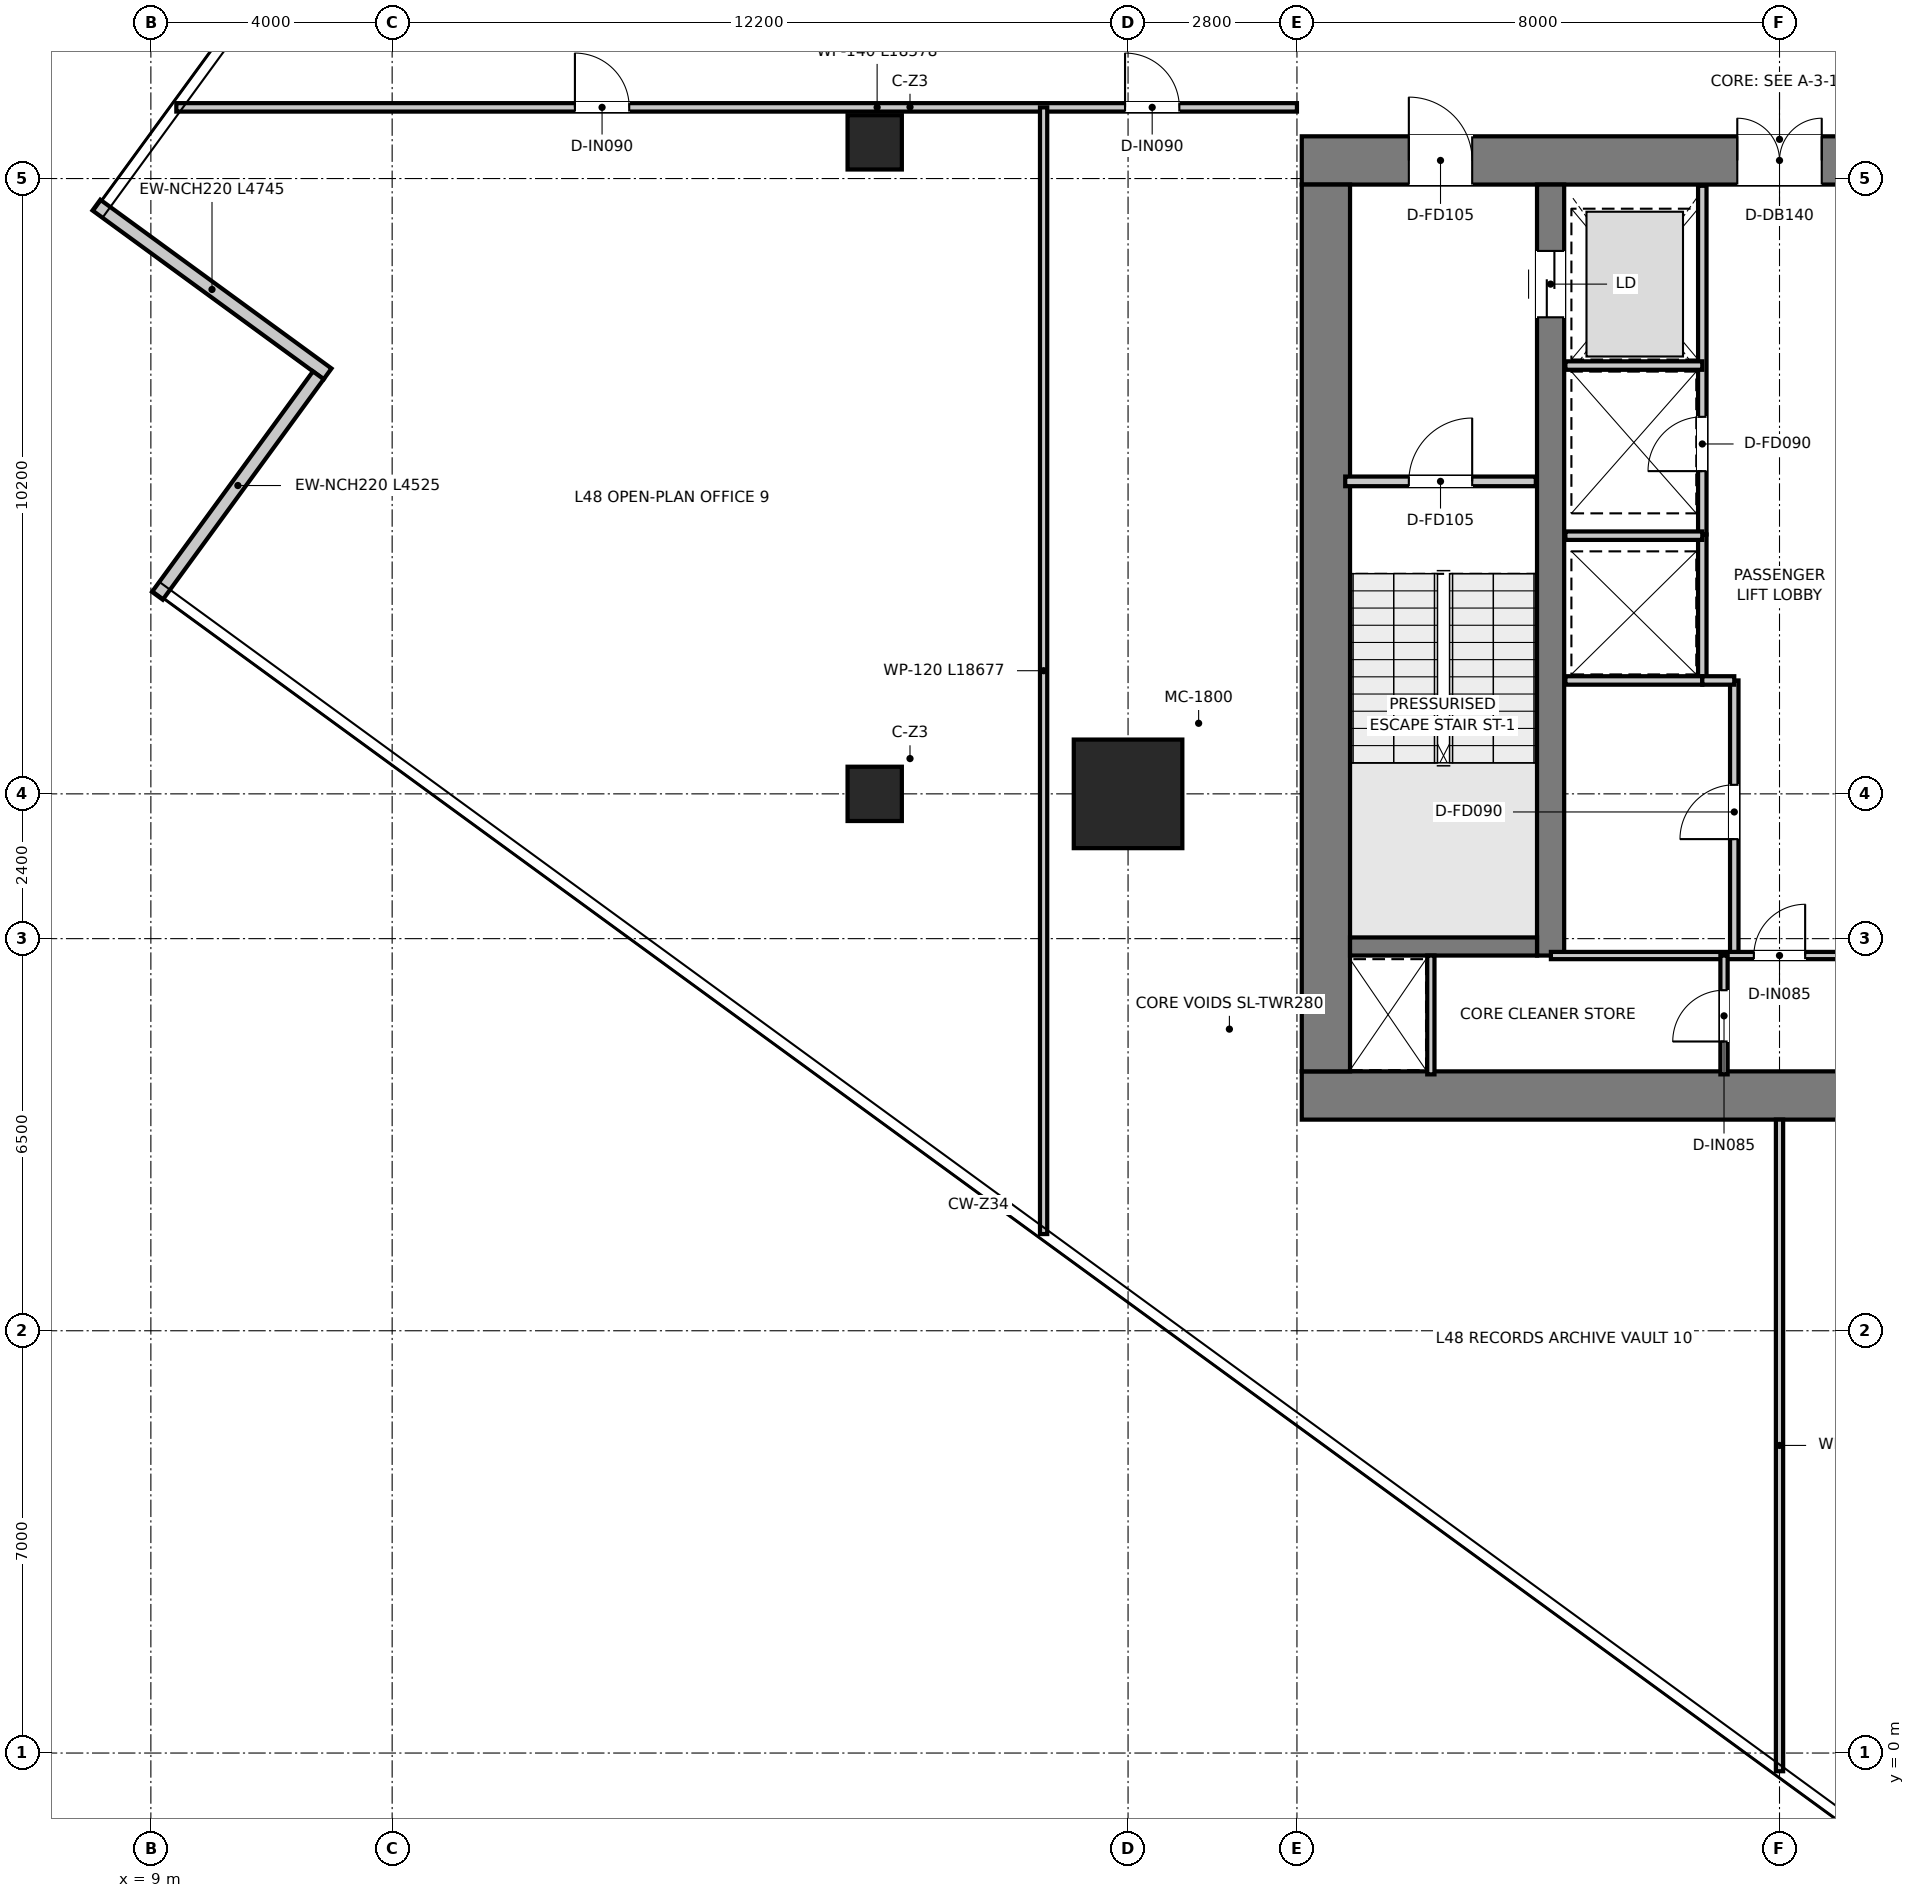
"""IFC4 building model, lengths in metres.
Left out: names, types, materials, properties, quantities, classifications, styles, units other than length and angle.
Written with IfcOpenShell. Run it as: python <this file> out.ifc"""

import sys

from ifc_helpers import new_model, si_unit, direction, frame, frame_2d, origin, origin_2d, place, context, subcontext, project, spatial, rectangle, extrude, source, transform, mapped, element, fill, save


model = new_model("IFC4")
c1 = context("Model", 3, precision=1e-05, world=origin(), true_north=direction((0.0, 1.0)))
c2 = subcontext(c1, "Body", "Model", "MODEL_VIEW")
j1 = project(units=[si_unit("LENGTHUNIT", "METRE"), si_unit("PLANEANGLEUNIT", "RADIAN")], contexts=[c1])
p1 = place(None, origin())
s1 = spatial("IfcSite", under=j1, at=p1, CompositionType="ELEMENT")
p2 = place(p1, origin())
s2 = spatial("IfcBuilding", under=s1, at=p2, CompositionType="ELEMENT")
p3 = place(p2, frame((0.0, 0.0, 197.55)))
s3 = spatial("IfcBuildingStorey", under=s2, at=p3, CompositionType="ELEMENT", Elevation=197.55)
p4 = place(p3, frame((28.08, 10.9, 0.0), z_axis=(0.0, 0.0, 1.0), x_axis=(1.0, 0.0, 0.0)))
e1 = element("IfcWall", 1, at=p4, inside=s3, PredefinedType="SHEAR", context=c2, shape_type="SweptSolid", body=[
    extrude(rectangle(XDim=15.84, YDim=0.8, at=frame_2d((7.92, 0.0))), origin(), (0.0, 0.0, 1.0), 3.95),
])
p5 = place(p3, frame((28.08, 26.4, 0.0), z_axis=(0.0, 0.0, 1.0), x_axis=(1.0, 0.0, 0.0)))
e2 = element("IfcWall", 2, at=p5, inside=s3, PredefinedType="SHEAR", context=c2, shape_type="SweptSolid", body=[
    extrude(rectangle(XDim=15.84, YDim=0.8, at=frame_2d((7.92, 0.0))), origin(), (0.0, 0.0, 1.0), 3.95),
])
p6 = place(p5, frame((7.22, 0.0, 0.0)))
e3 = element("IfcOpeningElement", 3, at=p6, cuts=e2, PredefinedType="OPENING", context=c2, shape_type="SweptSolid", body=[
    extrude(rectangle(XDim=1.4, YDim=2.2, at=frame_2d((0.7, 1.1))), frame((0.0, 0.41, 0.0), z_axis=(0.0, -1.0, 0.0), x_axis=(1.0, 0.0, 0.0)), (0.0, 0.0, 1.0), 0.82),
])
p7 = place(p5, frame((1.775, 0.0, 0.0)))
e4 = element("IfcOpeningElement", 4, at=p7, cuts=e2, PredefinedType="OPENING", context=c2, shape_type="SweptSolid", body=[
    extrude(rectangle(XDim=1.05, YDim=2.1, at=frame_2d((0.525, 1.05))), frame((0.0, 0.41, 0.0), z_axis=(0.0, -1.0, 0.0), x_axis=(1.0, 0.0, 0.0)), (0.0, 0.0, 1.0), 0.82),
])
p8 = place(p5, frame((13.015, 0.0, 0.0)))
e5 = element("IfcOpeningElement", 5, at=p8, cuts=e2, PredefinedType="OPENING", context=c2, shape_type="SweptSolid", body=[
    extrude(rectangle(XDim=1.05, YDim=2.1, at=frame_2d((0.525, 1.05))), frame((0.0, 0.41, 0.0), z_axis=(0.0, -1.0, 0.0), x_axis=(1.0, 0.0, 0.0)), (0.0, 0.0, 1.0), 0.82),
])
p9 = place(p3, frame((28.48, 11.3, 0.0), z_axis=(0.0, 0.0, 1.0), x_axis=(0.0, 1.0, 0.0)))
e6 = element("IfcWall", 6, at=p9, inside=s3, PredefinedType="SHEAR", context=c2, shape_type="SweptSolid", body=[
    extrude(rectangle(XDim=14.7, YDim=0.8, at=frame_2d((7.35, 0.0))), origin(), (0.0, 0.0, 1.0), 3.95),
])
p10 = place(p3, frame((32.205, 13.22, 0.0), z_axis=(0.0, 0.0, 1.0), x_axis=(0.0, 1.0, 0.0)))
e7 = element("IfcWall", 7, at=p10, inside=s3, PredefinedType="SHEAR", context=c2, shape_type="SweptSolid", body=[
    extrude(rectangle(XDim=12.78, YDim=0.45, at=frame_2d((6.39, 0.0))), origin(), (0.0, 0.0, 1.0), 3.95),
])
p11 = place(p10, frame((10.58, 0.0, 0.0)))
e8 = element("IfcOpeningElement", 8, at=p11, cuts=e7, PredefinedType="OPENING", context=c2, shape_type="SweptSolid", body=[
    extrude(rectangle(XDim=1.1, YDim=2.15, at=frame_2d((0.55, 1.075))), frame((0.0, 0.235, 0.0), z_axis=(0.0, -1.0, 0.0), x_axis=(1.0, 0.0, 0.0)), (0.0, 0.0, 1.0), 0.47),
])
p12 = place(p3, frame((28.88, 13.37, 0.0), z_axis=(0.0, 0.0, 1.0), x_axis=(1.0, 0.0, 0.0)))
e9 = element("IfcWall", 9, at=p12, inside=s3, PredefinedType="SHEAR", context=c2, shape_type="SweptSolid", body=[
    extrude(rectangle(XDim=3.1, YDim=0.3, at=frame_2d((1.55, 0.0))), origin(), (0.0, 0.0, 1.0), 3.95),
])
m1 = source(origin(), c2, "Body", "SweptSolid", [
    extrude(rectangle(XDim=1.8, YDim=1.8, at=origin_2d()), origin(), (0.0, 0.0, 1.0), 3.95),
])
p13 = place(p3, frame((25.2, 15.9, 0.0), z_axis=(0.0, 0.0, 1.0), x_axis=(1.0, 0.0, 0.0)))
e10 = element("IfcColumn", 10, at=p13, inside=s3, PredefinedType="USERDEFINED", context=c2, shape_type="MappedRepresentation", body=[
    mapped(m1, transform((0.0, 0.0, 0.0), x_axis=(1.0, 0.0, 0.0), y_axis=(0.0, 1.0, 0.0), z_axis=(0.0, 0.0, 1.0), scale=1.0)),
])
m2 = source(origin(), c2, "Body", "SweptSolid", [
    extrude(rectangle(XDim=0.9, YDim=0.9, at=origin_2d()), origin(), (0.0, 0.0, 1.0), 3.95),
])
for number, where, z_axis, x_axis in (
    (11, (21.0, 15.9, 0.0), (0.0, 0.0, 1.0), (1.0, 0.0, 0.0)),
    (12, (21.0, 26.7, 0.0), (0.0, 0.0, 1.0), (1.0, 0.0, 0.0)),
):
    element("IfcColumn", number, at=place(p3, frame(where, z_axis=z_axis, x_axis=x_axis)), inside=s3, PredefinedType="COLUMN", context=c2, shape_type="MappedRepresentation", body=[
        mapped(m2, transform((0.0, 0.0, 0.0), x_axis=(1.0, 0.0, 0.0), y_axis=(0.0, 1.0, 0.0), z_axis=(0.0, 0.0, 1.0), scale=1.0)),
    ])
p14 = place(p3, frame((8.097, 25.66, 0.0), z_axis=(0.0, 0.0, 1.0), x_axis=(0.807742607871, -0.589535308044, 0.0)))
e13 = element("IfcWall", 13, at=p14, inside=s3, PredefinedType="ELEMENTEDWALL", context=c2, shape_type="SweptSolid", body=[
    extrude(rectangle(XDim=4.745, YDim=0.22, at=frame_2d((2.373, 0.0))), origin(), (0.0, 0.0, 1.0), 3.59),
])
p15 = place(p3, frame((11.776, 22.839, 0.0), z_axis=(0.0, 0.0, 1.0), x_axis=(-0.589547091209, -0.807734007732, 0.0)))
e14 = element("IfcWall", 14, at=p15, inside=s3, PredefinedType="ELEMENTEDWALL", context=c2, shape_type="SweptSolid", body=[
    extrude(rectangle(XDim=4.525, YDim=0.22, at=frame_2d((2.263, 0.0))), origin(), (0.0, 0.0, 1.0), 3.59),
])
p16 = place(p3, frame((28.8, 21.08, 0.0), z_axis=(0.0, 0.0, 1.0), x_axis=(1.0, 0.0, 0.0)))
e15 = element("IfcWall", 15, at=p16, inside=s3, PredefinedType="PARTITIONING", context=c2, shape_type="SweptSolid", body=[
    extrude(rectangle(XDim=3.16, YDim=0.16, at=frame_2d((1.58, 0.0))), origin(), (0.0, 0.0, 1.0), 3.59),
])
p17 = place(p16, frame((1.055, 0.0, 0.0)))
e16 = element("IfcOpeningElement", 16, at=p17, cuts=e15, PredefinedType="OPENING", context=c2, shape_type="SweptSolid", body=[
    extrude(rectangle(XDim=1.05, YDim=2.1, at=frame_2d((0.525, 1.05))), frame((0.0, 0.09, 0.0), z_axis=(0.0, -1.0, 0.0), x_axis=(1.0, 0.0, 0.0)), (0.0, 0.0, 1.0), 0.18),
])
p18 = place(p3, frame((34.72, 20.2, 0.0), z_axis=(0.0, 0.0, 1.0), x_axis=(0.0, 1.0, 0.0)))
e17 = element("IfcWall", 17, at=p18, inside=s3, PredefinedType="PARTITIONING", context=c2, shape_type="SweptSolid", body=[
    extrude(rectangle(XDim=5.78, YDim=0.14, at=frame_2d((2.89, 0.0))), origin(), (0.0, 0.0, 1.0), 2.59),
])
p19 = place(p18, frame((1.05, 0.0, 0.0)))
e18 = element("IfcOpeningElement", 18, at=p19, cuts=e17, PredefinedType="OPENING", context=c2, shape_type="SweptSolid", body=[
    extrude(rectangle(XDim=0.9, YDim=2.1, at=frame_2d((0.45, 1.05))), frame((0.0, 0.08, 0.0), z_axis=(0.0, -1.0, 0.0), x_axis=(1.0, 0.0, 0.0)), (0.0, 0.0, 1.0), 0.16),
])
p20 = place(p3, frame((32.45, 23.0, 0.0), z_axis=(0.0, 0.0, 1.0), x_axis=(1.0, 0.0, 0.0)))
e19 = element("IfcWall", 19, at=p20, inside=s3, PredefinedType="PARTITIONING", context=c2, shape_type="SweptSolid", body=[
    extrude(rectangle(XDim=2.27, YDim=0.14, at=frame_2d((1.135, 0.0))), origin(), (0.0, 0.0, 1.0), 2.59),
])
p21 = place(p3, frame((34.72, 17.78, 0.0), z_axis=(0.0, 0.0, 1.0), x_axis=(0.0, 1.0, 0.0)))
e20 = element("IfcWall", 20, at=p21, inside=s3, PredefinedType="PARTITIONING", context=c2, shape_type="SweptSolid", body=[
    extrude(rectangle(XDim=2.42, YDim=0.14, at=frame_2d((1.21, 0.0))), origin(), (0.0, 0.0, 1.0), 3.59),
])
for number, where, z_axis, x_axis in (
    (21, (32.45, 17.78, 0.0), (0.0, 0.0, 1.0), (1.0, 0.0, 0.0)),
    (22, (32.45, 20.18, 0.0), (0.0, 0.0, 1.0), (1.0, 0.0, 0.0)),
):
    element("IfcWall", number, at=place(p3, frame(where, z_axis=z_axis, x_axis=x_axis)), inside=s3, PredefinedType="PARTITIONING", context=c2, shape_type="SweptSolid", body=[
        extrude(rectangle(XDim=2.27, YDim=0.14, at=frame_2d((1.135, 0.0))), origin(), (0.0, 0.0, 1.0), 3.59),
    ])
p22 = place(p3, frame((35.25, 13.22, 0.0), z_axis=(0.0, 0.0, 1.0), x_axis=(0.0, 1.0, 0.0)))
e23 = element("IfcWall", 23, at=p22, inside=s3, PredefinedType="PARTITIONING", context=c2, shape_type="SweptSolid", body=[
    extrude(rectangle(XDim=4.56, YDim=0.14, at=frame_2d((2.28, 0.0))), origin(), (0.0, 0.0, 1.0), 3.59),
])
p23 = place(p22, frame((1.93, 0.0, 0.0)))
e24 = element("IfcOpeningElement", 24, at=p23, cuts=e23, PredefinedType="OPENING", context=c2, shape_type="SweptSolid", body=[
    extrude(rectangle(XDim=0.9, YDim=2.1, at=frame_2d((0.45, 1.05))), frame((0.0, 0.08, 0.0), z_axis=(0.0, -1.0, 0.0), x_axis=(1.0, 0.0, 0.0)), (0.0, 0.0, 1.0), 0.16),
])
p24 = place(p3, frame((34.72, 17.78, 0.0), z_axis=(0.0, 0.0, 1.0), x_axis=(1.0, 0.0, 0.0)))
e25 = element("IfcWall", 25, at=p24, inside=s3, PredefinedType="PARTITIONING", context=c2, shape_type="SweptSolid", body=[
    extrude(rectangle(XDim=0.53, YDim=0.14, at=frame_2d((0.265, 0.0))), origin(), (0.0, 0.0, 1.0), 3.59),
])
p25 = place(p3, frame((30.22, 11.25, 0.0), z_axis=(0.0, 0.0, 1.0), x_axis=(0.0, 1.0, 0.0)))
e26 = element("IfcWall", 26, at=p25, inside=s3, PredefinedType="PARTITIONING", context=c2, shape_type="SweptSolid", body=[
    extrude(rectangle(XDim=1.97, YDim=0.12, at=frame_2d((0.985, 0.0))), origin(), (0.0, 0.0, 1.0), 3.59),
])
p26 = place(p3, frame((32.21, 13.22, 0.0), z_axis=(0.0, 0.0, 1.0), x_axis=(1.0, 0.0, 0.0)))
e27 = element("IfcWall", 27, at=p26, inside=s3, PredefinedType="PARTITIONING", context=c2, shape_type="SweptSolid", body=[
    extrude(rectangle(XDim=7.58, YDim=0.12, at=frame_2d((3.79, 0.0))), origin(), (0.0, 0.0, 1.0), 3.59),
])
p27 = place(p26, frame((3.365, 0.0, 0.0)))
e28 = element("IfcOpeningElement", 28, at=p27, cuts=e27, PredefinedType="OPENING", context=c2, shape_type="SweptSolid", body=[
    extrude(rectangle(XDim=0.85, YDim=2.1, at=frame_2d((0.425, 1.05))), frame((0.0, 0.07, 0.0), z_axis=(0.0, -1.0, 0.0), x_axis=(1.0, 0.0, 0.0)), (0.0, 0.0, 1.0), 0.14),
])
p28 = place(p3, frame((35.08, 11.25, 0.0), z_axis=(0.0, 0.0, 1.0), x_axis=(0.0, 1.0, 0.0)))
e29 = element("IfcWall", 29, at=p28, inside=s3, PredefinedType="PARTITIONING", context=c2, shape_type="SweptSolid", body=[
    extrude(rectangle(XDim=1.97, YDim=0.12, at=frame_2d((0.985, 0.0))), origin(), (0.0, 0.0, 1.0), 3.59),
])
p29 = place(p28, frame((0.545, 0.0, 0.0)))
e30 = element("IfcOpeningElement", 30, at=p29, cuts=e29, PredefinedType="OPENING", context=c2, shape_type="SweptSolid", body=[
    extrude(rectangle(XDim=0.85, YDim=2.1, at=frame_2d((0.425, 1.05))), frame((0.0, 0.07, 0.0), z_axis=(0.0, -1.0, 0.0), x_axis=(1.0, 0.0, 0.0)), (0.0, 0.0, 1.0), 0.14),
])
p30 = place(p3, frame((9.422, 27.28, 0.0), z_axis=(0.0, 0.0, 1.0), x_axis=(1.0, 0.0, 0.0)))
e31 = element("IfcWall", 31, at=p30, inside=s3, PredefinedType="PARTITIONING", context=c2, shape_type="SweptSolid", body=[
    extrude(rectangle(XDim=18.578, YDim=0.14, at=frame_2d((9.289, 0.0))), origin(), (0.0, 0.0, 1.0), 2.95),
])
p31 = place(p30, frame((6.608, 0.0, 0.0)))
e32 = element("IfcOpeningElement", 32, at=p31, cuts=e31, PredefinedType="OPENING", context=c2, shape_type="SweptSolid", body=[
    extrude(rectangle(XDim=0.9, YDim=2.1, at=frame_2d((0.45, 1.05))), frame((0.0, 0.08, 0.0), z_axis=(0.0, -1.0, 0.0), x_axis=(1.0, 0.0, 0.0)), (0.0, 0.0, 1.0), 0.16),
])
p32 = place(p30, frame((15.728, 0.0, 0.0)))
e33 = element("IfcOpeningElement", 33, at=p32, cuts=e31, PredefinedType="OPENING", context=c2, shape_type="SweptSolid", body=[
    extrude(rectangle(XDim=0.9, YDim=2.1, at=frame_2d((0.45, 1.05))), frame((0.0, 0.08, 0.0), z_axis=(0.0, -1.0, 0.0), x_axis=(1.0, 0.0, 0.0)), (0.0, 0.0, 1.0), 0.16),
])
p33 = place(p3, frame((36.0, -0.302, 0.0), z_axis=(0.0, 0.0, 1.0), x_axis=(0.0, 1.0, 0.0)))
e34 = element("IfcWall", 34, at=p33, inside=s3, PredefinedType="PARTITIONING", context=c2, shape_type="SweptSolid", body=[
    extrude(rectangle(XDim=10.802, YDim=0.12, at=frame_2d((5.401, 0.0))), origin(), (0.0, 0.0, 1.0), 3.59),
])
p34 = place(p3, frame((23.8, 8.603, 0.0), z_axis=(0.0, 0.0, 1.0), x_axis=(0.0, 1.0, 0.0)))
e35 = element("IfcWall", 35, at=p34, inside=s3, PredefinedType="PARTITIONING", context=c2, shape_type="SweptSolid", body=[
    extrude(rectangle(XDim=18.677, YDim=0.12, at=frame_2d((9.338, 0.0))), origin(), (0.0, 0.0, 1.0), 3.0),
])
p35 = place(p17, origin())
e36 = element("IfcDoor", 36, at=p35, inside=s3, OperationType="SINGLE_SWING_RIGHT", PredefinedType="DOOR", context=c2, shape_type="SweptSolid", body=[
    extrude(rectangle(XDim=1.05, YDim=2.1, at=frame_2d((0.525, 1.05))), frame((0.0, 0.025, 0.0), z_axis=(0.0, -1.0, 0.0), x_axis=(1.0, 0.0, 0.0)), (0.0, 0.0, 1.0), 0.05),
])
fill(e16, e36)
p36 = place(p6, origin())
e37 = element("IfcDoor", 37, at=p36, inside=s3, OperationType="DOUBLE_DOOR_SINGLE_SWING", PredefinedType="DOOR", context=c2, shape_type="SweptSolid", body=[
    extrude(rectangle(XDim=1.4, YDim=2.2, at=frame_2d((0.7, 1.1))), frame((0.0, 0.025, 0.0), z_axis=(0.0, -1.0, 0.0), x_axis=(1.0, 0.0, 0.0)), (0.0, 0.0, 1.0), 0.05),
])
fill(e3, e37)
p37 = place(p7, origin())
e38 = element("IfcDoor", 38, at=p37, inside=s3, OperationType="SINGLE_SWING_LEFT", PredefinedType="DOOR", context=c2, shape_type="SweptSolid", body=[
    extrude(rectangle(XDim=1.05, YDim=2.1, at=frame_2d((0.525, 1.05))), frame((0.0, 0.025, 0.0), z_axis=(0.0, -1.0, 0.0), x_axis=(1.0, 0.0, 0.0)), (0.0, 0.0, 1.0), 0.05),
])
fill(e4, e38)
p38 = place(p11, origin())
e39 = element("IfcDoor", 39, at=p38, inside=s3, OperationType="DOUBLE_DOOR_SLIDING", PredefinedType="DOOR", context=c2, shape_type="SweptSolid", body=[
    extrude(rectangle(XDim=1.1, YDim=2.15, at=frame_2d((0.55, 1.075))), frame((0.0, 0.025, 0.0), z_axis=(0.0, -1.0, 0.0), x_axis=(1.0, 0.0, 0.0)), (0.0, 0.0, 1.0), 0.05),
])
fill(e8, e39)
p39 = place(p19, origin())
e40 = element("IfcDoor", 40, at=p39, inside=s3, OperationType="SINGLE_SWING_LEFT", PredefinedType="DOOR", context=c2, shape_type="SweptSolid", body=[
    extrude(rectangle(XDim=0.9, YDim=2.1, at=frame_2d((0.45, 1.05))), frame((0.0, 0.025, 0.0), z_axis=(0.0, -1.0, 0.0), x_axis=(1.0, 0.0, 0.0)), (0.0, 0.0, 1.0), 0.05),
])
fill(e18, e40)
p40 = place(p23, origin())
e41 = element("IfcDoor", 41, at=p40, inside=s3, OperationType="SINGLE_SWING_LEFT", PredefinedType="DOOR", context=c2, shape_type="SweptSolid", body=[
    extrude(rectangle(XDim=0.9, YDim=2.1, at=frame_2d((0.45, 1.05))), frame((0.0, 0.025, 0.0), z_axis=(0.0, -1.0, 0.0), x_axis=(1.0, 0.0, 0.0)), (0.0, 0.0, 1.0), 0.05),
])
fill(e24, e41)
p41 = place(p27, origin())
e42 = element("IfcDoor", 42, at=p41, inside=s3, OperationType="SINGLE_SWING_RIGHT", PredefinedType="DOOR", context=c2, shape_type="SweptSolid", body=[
    extrude(rectangle(XDim=0.85, YDim=2.1, at=frame_2d((0.425, 1.05))), frame((0.0, 0.025, 0.0), z_axis=(0.0, -1.0, 0.0), x_axis=(1.0, 0.0, 0.0)), (0.0, 0.0, 1.0), 0.05),
])
fill(e28, e42)
p42 = place(p29, origin())
e43 = element("IfcDoor", 43, at=p42, inside=s3, OperationType="SINGLE_SWING_LEFT", PredefinedType="DOOR", context=c2, shape_type="SweptSolid", body=[
    extrude(rectangle(XDim=0.85, YDim=2.1, at=frame_2d((0.425, 1.05))), frame((0.0, 0.025, 0.0), z_axis=(0.0, -1.0, 0.0), x_axis=(1.0, 0.0, 0.0)), (0.0, 0.0, 1.0), 0.05),
])
fill(e30, e43)
p43 = place(p31, origin())
e44 = element("IfcDoor", 44, at=p43, inside=s3, OperationType="SINGLE_SWING_LEFT", PredefinedType="DOOR", context=c2, shape_type="SweptSolid", body=[
    extrude(rectangle(XDim=0.9, YDim=2.1, at=frame_2d((0.45, 1.05))), frame((0.0, 0.025, 0.0), z_axis=(0.0, -1.0, 0.0), x_axis=(1.0, 0.0, 0.0)), (0.0, 0.0, 1.0), 0.05),
])
fill(e32, e44)
p44 = place(p32, origin())
e45 = element("IfcDoor", 45, at=p44, inside=s3, OperationType="SINGLE_SWING_LEFT", PredefinedType="DOOR", context=c2, shape_type="SweptSolid", body=[
    extrude(rectangle(XDim=0.9, YDim=2.1, at=frame_2d((0.45, 1.05))), frame((0.0, 0.025, 0.0), z_axis=(0.0, -1.0, 0.0), x_axis=(1.0, 0.0, 0.0)), (0.0, 0.0, 1.0), 0.05),
])
fill(e33, e45)
save(model, sys.argv[1])
